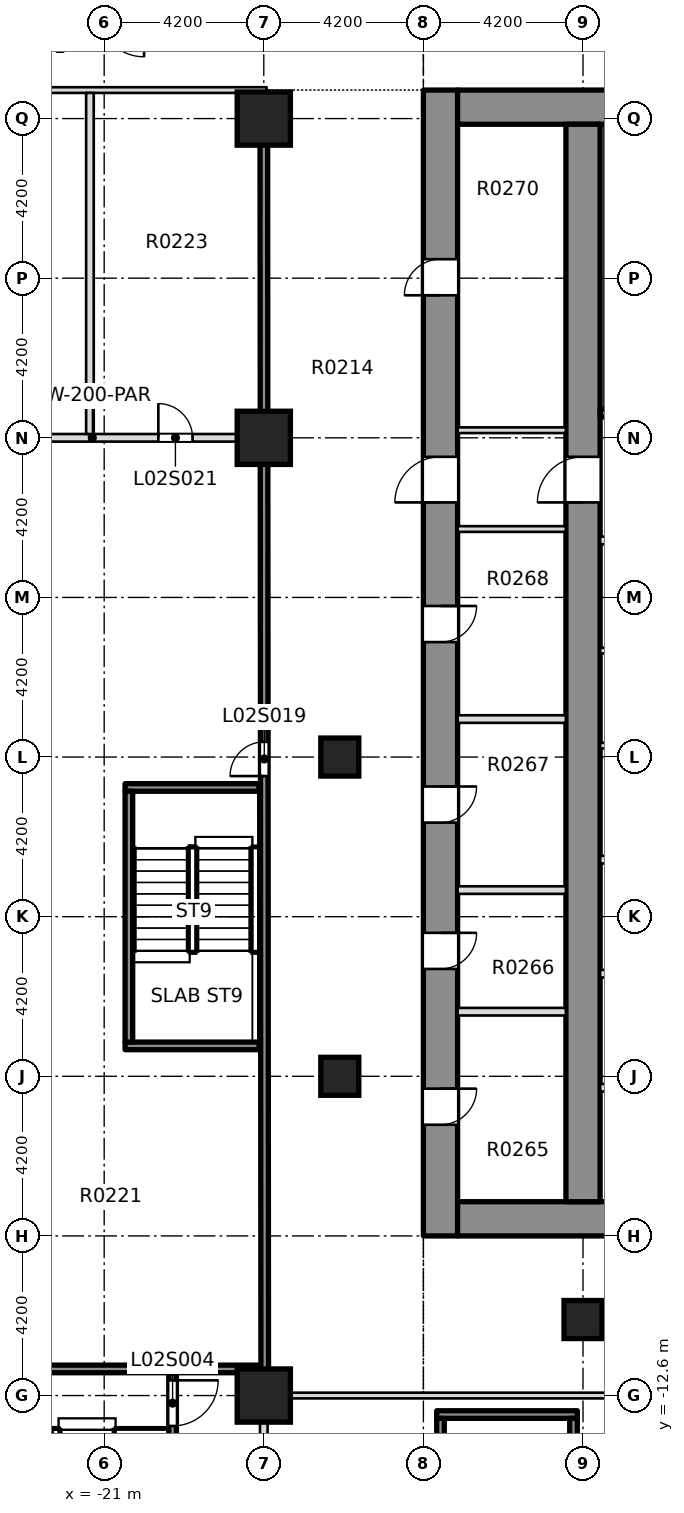
"""IFC4 building model, lengths in metres.
Left out: names, types, materials, properties, quantities, classifications, styles, units other than length and angle.
Written with IfcOpenShell. Run it as: python <this file> out.ifc"""

import sys

from ifc_helpers import new_model, si_unit, direction, frame, frame_2d, origin, origin_2d, place, context, subcontext, project, spatial, rectangle, extrude, element, fill, save


model = new_model("IFC4")
c1 = context("Model", 3, precision=1e-05, world=origin(), true_north=direction((0.0, 1.0)))
c2 = subcontext(c1, "Body", "Model", "MODEL_VIEW")
j1 = project(units=[si_unit("LENGTHUNIT", "METRE"), si_unit("PLANEANGLEUNIT", "RADIAN")], contexts=[c1])
p1 = place(None, origin())
s1 = spatial("IfcSite", under=j1, at=p1, CompositionType="ELEMENT")
p2 = place(p1, origin())
s2 = spatial("IfcBuilding", under=s1, at=p2, CompositionType="ELEMENT")
p3 = place(p2, frame((0.0, 0.0, 12.5)))
s3 = spatial("IfcBuildingStorey", under=s2, at=p3, CompositionType="ELEMENT", Elevation=12.5)
p4 = place(p3, frame((-12.15, -8.4, -0.4), z_axis=(0.0, 0.0, 1.0), x_axis=(0.0, 1.0, 0.0)))
e1 = element("IfcWall", 1, at=p4, inside=s3, PredefinedType="SHEAR", context=c2, shape_type="SweptSolid", body=[
    extrude(rectangle(XDim=30.15, YDim=0.9, at=frame_2d((15.075, 0.0))), origin(), (0.0, 0.0, 1.0), 7.5),
])
p5 = place(p4, frame((2.925, 0.0, 0.4)))
e2 = element("IfcOpeningElement", 2, at=p5, cuts=e1, PredefinedType="OPENING", context=c2, shape_type="SweptSolid", body=[
    extrude(rectangle(XDim=0.95, YDim=2.1, at=frame_2d((0.475, 1.05))), frame((0.0, 0.46, 0.0), z_axis=(0.0, -1.0, 0.0), x_axis=(1.0, 0.0, 0.0)), (0.0, 0.0, 1.0), 0.92),
])
p6 = place(p4, frame((7.025, 0.0, 0.4)))
e3 = element("IfcOpeningElement", 3, at=p6, cuts=e1, PredefinedType="OPENING", context=c2, shape_type="SweptSolid", body=[
    extrude(rectangle(XDim=0.95, YDim=2.1, at=frame_2d((0.475, 1.05))), frame((0.0, 0.46, 0.0), z_axis=(0.0, -1.0, 0.0), x_axis=(1.0, 0.0, 0.0)), (0.0, 0.0, 1.0), 0.92),
])
p7 = place(p4, frame((10.875, 0.0, 0.4)))
e4 = element("IfcOpeningElement", 4, at=p7, cuts=e1, PredefinedType="OPENING", context=c2, shape_type="SweptSolid", body=[
    extrude(rectangle(XDim=0.95, YDim=2.1, at=frame_2d((0.475, 1.05))), frame((0.0, 0.46, 0.0), z_axis=(0.0, -1.0, 0.0), x_axis=(1.0, 0.0, 0.0)), (0.0, 0.0, 1.0), 0.92),
])
p8 = place(p4, frame((15.625, 0.0, 0.4)))
e5 = element("IfcOpeningElement", 5, at=p8, cuts=e1, PredefinedType="OPENING", context=c2, shape_type="SweptSolid", body=[
    extrude(rectangle(XDim=0.95, YDim=2.1, at=frame_2d((0.475, 1.05))), frame((0.0, 0.46, 0.0), z_axis=(0.0, -1.0, 0.0), x_axis=(1.0, 0.0, 0.0)), (0.0, 0.0, 1.0), 0.92),
])
p9 = place(p4, frame((24.75, 0.0, 0.4)))
e6 = element("IfcOpeningElement", 6, at=p9, cuts=e1, PredefinedType="OPENING", context=c2, shape_type="SweptSolid", body=[
    extrude(rectangle(XDim=0.95, YDim=2.1, at=frame_2d((0.475, 1.05))), frame((0.0, 0.46, 0.0), z_axis=(0.0, -1.0, 0.0), x_axis=(1.0, 0.0, 0.0)), (0.0, 0.0, 1.0), 0.92),
])
p10 = place(p4, frame((19.3, 0.0, 0.4)))
e7 = element("IfcOpeningElement", 7, at=p10, cuts=e1, PredefinedType="OPENING", context=c2, shape_type="SweptSolid", body=[
    extrude(rectangle(XDim=1.2, YDim=2.1, at=frame_2d((0.6, 1.05))), frame((0.0, 0.46, 0.0), z_axis=(0.0, -1.0, 0.0), x_axis=(1.0, 0.0, 0.0)), (0.0, 0.0, 1.0), 0.92),
])
p11 = place(p3, frame((-11.7, -7.95, -0.4), z_axis=(0.0, 0.0, 1.0), x_axis=(1.0, 0.0, 0.0)))
e8 = element("IfcWall", 8, at=p11, inside=s3, PredefinedType="SHEAR", context=c2, shape_type="SweptSolid", body=[
    extrude(rectangle(XDim=23.4, YDim=0.9, at=frame_2d((11.7, 0.0))), origin(), (0.0, 0.0, 1.0), 7.5),
])
p12 = place(p11, frame((6.95, 0.0, 0.4)))
e9 = element("IfcOpeningElement", 9, at=p12, cuts=e8, PredefinedType="OPENING", context=c2, shape_type="SweptSolid", body=[
    extrude(rectangle(XDim=1.8, YDim=2.1, at=frame_2d((0.9, 1.05))), frame((0.0, 0.46, 0.0), z_axis=(0.0, -1.0, 0.0), x_axis=(1.0, 0.0, 0.0)), (0.0, 0.0, 1.0), 0.92),
])
p13 = place(p11, frame((14.65, 0.0, 0.4)))
e10 = element("IfcOpeningElement", 10, at=p13, cuts=e8, PredefinedType="OPENING", context=c2, shape_type="SweptSolid", body=[
    extrude(rectangle(XDim=1.8, YDim=2.1, at=frame_2d((0.9, 1.05))), frame((0.0, 0.46, 0.0), z_axis=(0.0, -1.0, 0.0), x_axis=(1.0, 0.0, 0.0)), (0.0, 0.0, 1.0), 0.92),
])
p14 = place(p3, frame((-11.7, 21.3, -0.4), z_axis=(0.0, 0.0, 1.0), x_axis=(1.0, 0.0, 0.0)))
e11 = element("IfcWall", 11, at=p14, inside=s3, PredefinedType="SOLIDWALL", context=c2, shape_type="SweptSolid", body=[
    extrude(rectangle(XDim=23.4, YDim=0.9, at=frame_2d((11.7, 0.0))), origin(), (0.0, 0.0, 1.0), 7.5),
])
p15 = place(p3, frame((-8.4, -7.5, -0.4), z_axis=(0.0, 0.0, 1.0), x_axis=(0.0, 1.0, 0.0)))
e12 = element("IfcWall", 12, at=p15, inside=s3, PredefinedType="SHEAR", context=c2, shape_type="SweptSolid", body=[
    extrude(rectangle(XDim=28.35, YDim=0.9, at=frame_2d((14.175, 0.0))), origin(), (0.0, 0.0, 1.0), 7.5),
])
p16 = place(p15, frame((18.4, 0.0, 0.4)))
e13 = element("IfcOpeningElement", 13, at=p16, cuts=e12, PredefinedType="OPENING", context=c2, shape_type="SweptSolid", body=[
    extrude(rectangle(XDim=1.2, YDim=2.1, at=frame_2d((0.6, 1.05))), frame((0.0, 0.46, 0.0), z_axis=(0.0, -1.0, 0.0), x_axis=(1.0, 0.0, 0.0)), (0.0, 0.0, 1.0), 0.92),
])
for number, where, z_axis, x_axis in (
    (14, (-16.8, -12.6, -0.4), (0.0, 0.0, 1.0), (1.0, 0.0, 0.0)),
    (15, (-16.8, 12.6, -0.4), (0.0, 0.0, 1.0), (1.0, 0.0, 0.0)),
    (16, (-16.8, 21.0, -0.4), (0.0, 0.0, 1.0), (1.0, 0.0, 0.0)),
):
    element("IfcColumn", number, at=place(p3, frame(where, z_axis=z_axis, x_axis=x_axis)), inside=s3, PredefinedType="COLUMN", context=c2, shape_type="SweptSolid", body=[
        extrude(rectangle(XDim=1.4, YDim=1.4, at=origin_2d()), origin(), (0.0, 0.0, 1.0), 7.5),
    ])
for number, where, z_axis, x_axis in (
    (17, (-8.4, -10.6, -0.4), (0.0, 0.0, 1.0), (1.0, 0.0, 0.0)),
    (18, (-14.8, -4.2, -0.4), (0.0, 0.0, 1.0), (1.0, 0.0, 0.0)),
    (19, (-14.8, 4.2, -0.4), (0.0, 0.0, 1.0), (1.0, 0.0, 0.0)),
):
    element("IfcColumn", number, at=place(p3, frame(where, z_axis=z_axis, x_axis=x_axis)), inside=s3, PredefinedType="COLUMN", context=c2, shape_type="SweptSolid", body=[
        extrude(rectangle(XDim=1.0, YDim=1.0, at=origin_2d()), origin(), (0.0, 0.0, 1.0), 7.5),
    ])
p17 = place(p3, frame((-16.9, -12.6, 0.0), z_axis=(0.0, 0.0, 1.0), x_axis=(1.0, 0.0, 0.0)))
e20 = element("IfcWall", 20, at=p17, inside=s3, PredefinedType="PARTITIONING", context=c2, shape_type="SweptSolid", body=[
    extrude(rectangle(XDim=9.625, YDim=0.15, at=frame_2d((4.812, 0.0))), origin(), (0.0, 0.0, 1.0), 7.1),
])
p18 = place(p3, frame((-25.2, -11.9, 0.0), z_axis=(0.0, 0.0, 1.0), x_axis=(1.0, 0.0, 0.0)))
e21 = element("IfcWall", 21, at=p18, inside=s3, PredefinedType="SOLIDWALL", context=c2, shape_type="SweptSolid", body=[
    extrude(rectangle(XDim=8.325, YDim=0.2, at=frame_2d((4.163, 0.0))), origin(), (0.0, 0.0, 1.0), 7.1),
])
p19 = place(p3, frame((-25.75, 12.6, 0.0), z_axis=(0.0, 0.0, 1.0), x_axis=(1.0, 0.0, 0.0)))
e22 = element("IfcWall", 22, at=p19, inside=s3, PredefinedType="PARTITIONING", context=c2, shape_type="SweptSolid", body=[
    extrude(rectangle(XDim=8.875, YDim=0.2, at=frame_2d((4.438, 0.0))), origin(), (0.0, 0.0, 1.0), 7.1),
])
p20 = place(p19, frame((1.738, 0.0, 0.0)))
e23 = element("IfcOpeningElement", 23, at=p20, cuts=e22, PredefinedType="OPENING", context=c2, shape_type="SweptSolid", body=[
    extrude(rectangle(XDim=0.9, YDim=2.1, at=frame_2d((0.45, 1.05))), frame((0.0, 0.11, 0.0), z_axis=(0.0, -1.0, 0.0), x_axis=(1.0, 0.0, 0.0)), (0.0, 0.0, 1.0), 0.22),
])
p21 = place(p19, frame((6.175, 0.0, 0.0)))
e24 = element("IfcOpeningElement", 24, at=p21, cuts=e22, PredefinedType="OPENING", context=c2, shape_type="SweptSolid", body=[
    extrude(rectangle(XDim=0.9, YDim=2.1, at=frame_2d((0.45, 1.05))), frame((0.0, 0.11, 0.0), z_axis=(0.0, -1.0, 0.0), x_axis=(1.0, 0.0, 0.0)), (0.0, 0.0, 1.0), 0.22),
])
p22 = place(p3, frame((-24.675, 21.75, 0.0), z_axis=(0.0, 0.0, 1.0), x_axis=(1.0, 0.0, 0.0)))
e25 = element("IfcWall", 25, at=p22, inside=s3, PredefinedType="PARTITIONING", context=c2, shape_type="SweptSolid", body=[
    extrude(rectangle(XDim=7.95, YDim=0.15, at=frame_2d((3.975, 0.0))), origin(), (0.0, 0.0, 1.0), 7.1),
])
p23 = place(p3, frame((-21.375, 12.7, 0.0), z_axis=(0.0, 0.0, 1.0), x_axis=(0.0, 1.0, 0.0)))
e26 = element("IfcWall", 26, at=p23, inside=s3, PredefinedType="PARTITIONING", context=c2, shape_type="SweptSolid", body=[
    extrude(rectangle(XDim=8.975, YDim=0.2, at=frame_2d((4.488, 0.0))), origin(), (0.0, 0.0, 1.0), 7.1),
])
p24 = place(p3, frame((-19.2, -18.125, 0.0), z_axis=(0.0, 0.0, 1.0), x_axis=(0.0, 1.0, 0.0)))
e27 = element("IfcWall", 27, at=p24, inside=s3, PredefinedType="SOLIDWALL", context=c2, shape_type="SweptSolid", body=[
    extrude(rectangle(XDim=6.125, YDim=0.2, at=frame_2d((3.062, 0.0))), origin(), (0.0, 0.0, 1.0), 7.1),
])
p25 = place(p24, frame((4.725, 0.0, 0.0)))
e28 = element("IfcOpeningElement", 28, at=p25, cuts=e27, PredefinedType="OPENING", context=c2, shape_type="SweptSolid", body=[
    extrude(rectangle(XDim=1.2, YDim=2.1, at=frame_2d((0.6, 1.05))), frame((0.0, 0.11, 0.0), z_axis=(0.0, -1.0, 0.0), x_axis=(1.0, 0.0, 0.0)), (0.0, 0.0, 1.0), 0.22),
])
p26 = place(p3, frame((-16.8, -18.125, 0.0), z_axis=(0.0, 0.0, 1.0), x_axis=(0.0, 1.0, 0.0)))
e29 = element("IfcWall", 29, at=p26, inside=s3, PredefinedType="PARTITIONING", context=c2, shape_type="SweptSolid", body=[
    extrude(rectangle(XDim=5.45, YDim=0.2, at=frame_2d((2.725, 0.0))), origin(), (0.0, 0.0, 1.0), 7.1),
])
p27 = place(p3, frame((-16.775, -12.525, 0.0), z_axis=(0.0, 0.0, 1.0), x_axis=(-0.000727609751, 0.999999735292, 0.0)))
e30 = element("IfcWall", 30, at=p27, inside=s3, PredefinedType="SOLIDWALL", context=c2, shape_type="SweptSolid", body=[
    extrude(rectangle(XDim=34.225, YDim=0.2, at=frame_2d((17.112, 0.0))), origin(), (0.0, 0.0, 1.0), 7.1),
])
p28 = place(p27, frame((16.225, 0.0, 0.0)))
e31 = element("IfcOpeningElement", 31, at=p28, cuts=e30, PredefinedType="OPENING", context=c2, shape_type="SweptSolid", body=[
    extrude(rectangle(XDim=0.9, YDim=2.1, at=frame_2d((0.45, 1.05))), frame((0.0, 0.11, 0.0), z_axis=(0.0, -1.0, 0.0), x_axis=(1.0, 0.0, 0.0)), (0.0, 0.0, 1.0), 0.22),
])
for number, where, z_axis, x_axis in (
    (32, (-7.949, -4.5, 0.0), (0.0, 0.0, 1.0), (1.0, 0.0, 0.0)),
    (33, (-7.949, -1.5, 0.0), (0.0, 0.0, 1.0), (1.0, 0.0, 0.0)),
    (34, (-7.949, 1.5, 0.0), (0.0, 0.0, 1.0), (1.0, 0.0, 0.0)),
):
    element("IfcWall", number, at=place(p3, frame(where, z_axis=z_axis, x_axis=x_axis)), inside=s3, PredefinedType="PARTITIONING", context=c2, shape_type="SweptSolid", body=[
        extrude(rectangle(XDim=2.374, YDim=0.2, at=frame_2d((1.187, 0.0))), origin(), (0.0, 0.0, 1.0), 7.1),
    ])
p29 = place(p3, frame((-7.949, 4.5, 0.0), z_axis=(0.0, 0.0, 1.0), x_axis=(1.0, 0.0, 0.0)))
e35 = element("IfcWall", 35, at=p29, inside=s3, PredefinedType="PARTITIONING", context=c2, shape_type="SweptSolid", body=[
    extrude(rectangle(XDim=2.524, YDim=0.15, at=frame_2d((1.262, 0.0))), origin(), (0.0, 0.0, 1.0), 7.1),
])
p30 = place(p3, frame((-7.949, 7.0, 0.0), z_axis=(0.0, 0.0, 1.0), x_axis=(1.0, 0.0, 0.0)))
e36 = element("IfcWall", 36, at=p30, inside=s3, PredefinedType="PARTITIONING", context=c2, shape_type="SweptSolid", body=[
    extrude(rectangle(XDim=15.898, YDim=0.15, at=frame_2d((7.949, 0.0))), origin(), (0.0, 0.0, 1.0), 7.1),
])
p31 = place(p30, frame((7.249, 0.0, 0.0)))
e37 = element("IfcOpeningElement", 37, at=p31, cuts=e36, PredefinedType="OPENING", context=c2, shape_type="SweptSolid", body=[
    extrude(rectangle(XDim=1.4, YDim=2.1, at=frame_2d((0.7, 1.05))), frame((0.0, 0.085, 0.0), z_axis=(0.0, -1.0, 0.0), x_axis=(1.0, 0.0, 0.0)), (0.0, 0.0, 1.0), 0.17),
])
p32 = place(p3, frame((-7.949, 9.9, 0.0), z_axis=(0.0, 0.0, 1.0), x_axis=(1.0, 0.0, 0.0)))
e38 = element("IfcWall", 38, at=p32, inside=s3, PredefinedType="PARTITIONING", context=c2, shape_type="SweptSolid", body=[
    extrude(rectangle(XDim=4.349, YDim=0.2, at=frame_2d((2.174, 0.0))), origin(), (0.0, 0.0, 1.0), 7.1),
])
p33 = place(p32, frame((0.999, 0.0, 0.0)))
e39 = element("IfcOpeningElement", 39, at=p33, cuts=e38, PredefinedType="OPENING", context=c2, shape_type="SweptSolid", body=[
    extrude(rectangle(XDim=1.1, YDim=2.1, at=frame_2d((0.55, 1.05))), frame((0.0, 0.11, 0.0), z_axis=(0.0, -1.0, 0.0), x_axis=(1.0, 0.0, 0.0)), (0.0, 0.0, 1.0), 0.22),
])
p34 = place(p3, frame((-7.949, 13.25, 0.0), z_axis=(0.0, 0.0, 1.0), x_axis=(1.0, 0.0, 0.0)))
e40 = element("IfcWall", 40, at=p34, inside=s3, PredefinedType="SOLIDWALL", context=c2, shape_type="SweptSolid", body=[
    extrude(rectangle(XDim=4.524, YDim=0.2, at=frame_2d((2.262, 0.0))), origin(), (0.0, 0.0, 1.0), 7.1),
])
p35 = place(p34, frame((1.499, 0.0, 0.0)))
e41 = element("IfcOpeningElement", 41, at=p35, cuts=e40, PredefinedType="OPENING", context=c2, shape_type="SweptSolid", body=[
    extrude(rectangle(XDim=1.2, YDim=2.1, at=frame_2d((0.6, 1.05))), frame((0.0, 0.11, 0.0), z_axis=(0.0, -1.0, 0.0), x_axis=(1.0, 0.0, 0.0)), (0.0, 0.0, 1.0), 0.22),
])
for number, where, z_axis, x_axis in (
    (42, (-11.699, -2.5, 0.0), (0.0, 0.0, 1.0), (1.0, 0.0, 0.0)),
    (43, (-11.699, 0.7, 0.0), (0.0, 0.0, 1.0), (1.0, 0.0, 0.0)),
    (44, (-11.699, 5.2, 0.0), (0.0, 0.0, 1.0), (1.0, 0.0, 0.0)),
):
    element("IfcWall", number, at=place(p3, frame(where, z_axis=z_axis, x_axis=x_axis)), inside=s3, PredefinedType="PARTITIONING", context=c2, shape_type="SweptSolid", body=[
        extrude(rectangle(XDim=2.848, YDim=0.2, at=frame_2d((1.424, 0.0))), origin(), (0.0, 0.0, 1.0), 7.1),
    ])
for number, where, z_axis, x_axis in (
    (45, (-11.699, 10.2, 0.0), (0.0, 0.0, 1.0), (1.0, 0.0, 0.0)),
    (46, (-11.699, 12.8, 0.0), (0.0, 0.0, 1.0), (1.0, 0.0, 0.0)),
):
    element("IfcWall", number, at=place(p3, frame(where, z_axis=z_axis, x_axis=x_axis)), inside=s3, PredefinedType="PARTITIONING", context=c2, shape_type="SweptSolid", body=[
        extrude(rectangle(XDim=2.848, YDim=0.15, at=frame_2d((1.424, 0.0))), origin(), (0.0, 0.0, 1.0), 7.1),
    ])
p36 = place(p3, frame((-12.25, -13.1, 0.0), z_axis=(0.0, 0.0, 1.0), x_axis=(1.0, 0.0, 0.0)))
e47 = element("IfcWall", 47, at=p36, inside=s3, PredefinedType="SOLIDWALL", context=c2, shape_type="SweptSolid", body=[
    extrude(rectangle(XDim=3.7, YDim=0.2, at=frame_2d((1.85, 0.0))), origin(), (0.0, 0.0, 1.0), 7.1),
])
p37 = place(p3, frame((-12.15, -19.8, 0.0), z_axis=(0.0, 0.0, 1.0), x_axis=(0.0, 1.0, 0.0)))
e48 = element("IfcWall", 48, at=p37, inside=s3, PredefinedType="SOLIDWALL", context=c2, shape_type="SweptSolid", body=[
    extrude(rectangle(XDim=6.6, YDim=0.2, at=frame_2d((3.3, 0.0))), origin(), (0.0, 0.0, 1.0), 7.1),
])
p38 = place(p3, frame((-8.65, -20.3, 0.0), z_axis=(0.0, 0.0, 1.0), x_axis=(0.0, 1.0, 0.0)))
e49 = element("IfcWall", 49, at=p38, inside=s3, PredefinedType="SOLIDWALL", context=c2, shape_type="SweptSolid", body=[
    extrude(rectangle(XDim=7.1, YDim=0.2, at=frame_2d((3.55, 0.0))), origin(), (0.0, 0.0, 1.0), 7.1),
])
for number, where, z_axis, x_axis in (
    (50, (-20.45, -3.4, 0.0), (0.0, 0.0, 1.0), (1.0, 0.0, 0.0)),
    (51, (-20.45, 3.4, 0.0), (0.0, 0.0, 1.0), (1.0, 0.0, 0.0)),
):
    element("IfcWall", number, at=place(p3, frame(where, z_axis=z_axis, x_axis=x_axis)), inside=s3, PredefinedType="SOLIDWALL", context=c2, shape_type="SweptSolid", body=[
        extrude(rectangle(XDim=3.525, YDim=0.2, at=frame_2d((1.762, 0.0))), origin(), (0.0, 0.0, 1.0), 7.1),
    ])
p39 = place(p3, frame((-20.35, -3.3, 0.0), z_axis=(0.0, 0.0, 1.0), x_axis=(0.0, 1.0, 0.0)))
e52 = element("IfcWall", 52, at=p39, inside=s3, PredefinedType="SOLIDWALL", context=c2, shape_type="SweptSolid", body=[
    extrude(rectangle(XDim=6.6, YDim=0.2, at=frame_2d((3.3, 0.0))), origin(), (0.0, 0.0, 1.0), 7.1),
])
p40 = place(p25, origin())
e53 = element("IfcDoor", 53, at=p40, inside=s3, OperationType="DOUBLE_DOOR_SINGLE_SWING", PredefinedType="DOOR", context=c2, shape_type="SweptSolid", body=[
    extrude(rectangle(XDim=1.2, YDim=2.1, at=frame_2d((0.6, 1.05))), frame((0.0, 0.025, 0.0), z_axis=(0.0, -1.0, 0.0), x_axis=(1.0, 0.0, 0.0)), (0.0, 0.0, 1.0), 0.05),
])
fill(e28, e53)
p41 = place(p28, origin())
e54 = element("IfcDoor", 54, at=p41, inside=s3, OperationType="SINGLE_SWING_LEFT", PredefinedType="DOOR", context=c2, shape_type="SweptSolid", body=[
    extrude(rectangle(XDim=0.9, YDim=2.1, at=frame_2d((0.45, 1.05))), frame((0.0, 0.025, 0.0), z_axis=(0.0, -1.0, 0.0), x_axis=(1.0, 0.0, 0.0)), (0.0, 0.0, 1.0), 0.05),
])
fill(e31, e54)
p42 = place(p21, origin())
e55 = element("IfcDoor", 55, at=p42, inside=s3, OperationType="SINGLE_SWING_LEFT", PredefinedType="DOOR", context=c2, shape_type="SweptSolid", body=[
    extrude(rectangle(XDim=0.9, YDim=2.1, at=frame_2d((0.45, 1.05))), frame((0.0, 0.025, 0.0), z_axis=(0.0, -1.0, 0.0), x_axis=(1.0, 0.0, 0.0)), (0.0, 0.0, 1.0), 0.05),
])
fill(e24, e55)
p43 = place(p5, origin())
e56 = element("IfcDoor", 56, at=p43, inside=s3, OperationType="SINGLE_SWING_LEFT", PredefinedType="DOOR", context=c2, shape_type="SweptSolid", body=[
    extrude(rectangle(XDim=0.95, YDim=2.1, at=frame_2d((0.475, 1.05))), frame((0.0, 0.025, 0.0), z_axis=(0.0, -1.0, 0.0), x_axis=(1.0, 0.0, 0.0)), (0.0, 0.0, 1.0), 0.05),
])
fill(e2, e56)
p44 = place(p6, origin())
e57 = element("IfcDoor", 57, at=p44, inside=s3, OperationType="SINGLE_SWING_LEFT", PredefinedType="DOOR", context=c2, shape_type="SweptSolid", body=[
    extrude(rectangle(XDim=0.95, YDim=2.1, at=frame_2d((0.475, 1.05))), frame((0.0, 0.025, 0.0), z_axis=(0.0, -1.0, 0.0), x_axis=(1.0, 0.0, 0.0)), (0.0, 0.0, 1.0), 0.05),
])
fill(e3, e57)
p45 = place(p7, origin())
e58 = element("IfcDoor", 58, at=p45, inside=s3, OperationType="SINGLE_SWING_LEFT", PredefinedType="DOOR", context=c2, shape_type="SweptSolid", body=[
    extrude(rectangle(XDim=0.95, YDim=2.1, at=frame_2d((0.475, 1.05))), frame((0.0, 0.025, 0.0), z_axis=(0.0, -1.0, 0.0), x_axis=(1.0, 0.0, 0.0)), (0.0, 0.0, 1.0), 0.05),
])
fill(e4, e58)
p46 = place(p8, origin())
e59 = element("IfcDoor", 59, at=p46, inside=s3, OperationType="SINGLE_SWING_LEFT", PredefinedType="DOOR", context=c2, shape_type="SweptSolid", body=[
    extrude(rectangle(XDim=0.95, YDim=2.1, at=frame_2d((0.475, 1.05))), frame((0.0, 0.025, 0.0), z_axis=(0.0, -1.0, 0.0), x_axis=(1.0, 0.0, 0.0)), (0.0, 0.0, 1.0), 0.05),
])
fill(e5, e59)
p47 = place(p9, origin())
e60 = element("IfcDoor", 60, at=p47, inside=s3, OperationType="SINGLE_SWING_LEFT", PredefinedType="DOOR", context=c2, shape_type="SweptSolid", body=[
    extrude(rectangle(XDim=0.95, YDim=2.1, at=frame_2d((0.475, 1.05))), frame((0.0, 0.025, 0.0), z_axis=(0.0, -1.0, 0.0), x_axis=(1.0, 0.0, 0.0)), (0.0, 0.0, 1.0), 0.05),
])
fill(e6, e60)
p48 = place(p10, origin())
e61 = element("IfcDoor", 61, at=p48, inside=s3, OperationType="SINGLE_SWING_LEFT", PredefinedType="DOOR", context=c2, shape_type="SweptSolid", body=[
    extrude(rectangle(XDim=1.2, YDim=2.1, at=frame_2d((0.6, 1.05))), frame((0.0, 0.025, 0.0), z_axis=(0.0, -1.0, 0.0), x_axis=(1.0, 0.0, 0.0)), (0.0, 0.0, 1.0), 0.05),
])
fill(e7, e61)
p49 = place(p16, origin())
e62 = element("IfcDoor", 62, at=p49, inside=s3, OperationType="SINGLE_SWING_LEFT", PredefinedType="DOOR", context=c2, shape_type="SweptSolid", body=[
    extrude(rectangle(XDim=1.2, YDim=2.1, at=frame_2d((0.6, 1.05))), frame((0.0, 0.025, 0.0), z_axis=(0.0, -1.0, 0.0), x_axis=(1.0, 0.0, 0.0)), (0.0, 0.0, 1.0), 0.05),
])
fill(e13, e62)
save(model, sys.argv[1])
